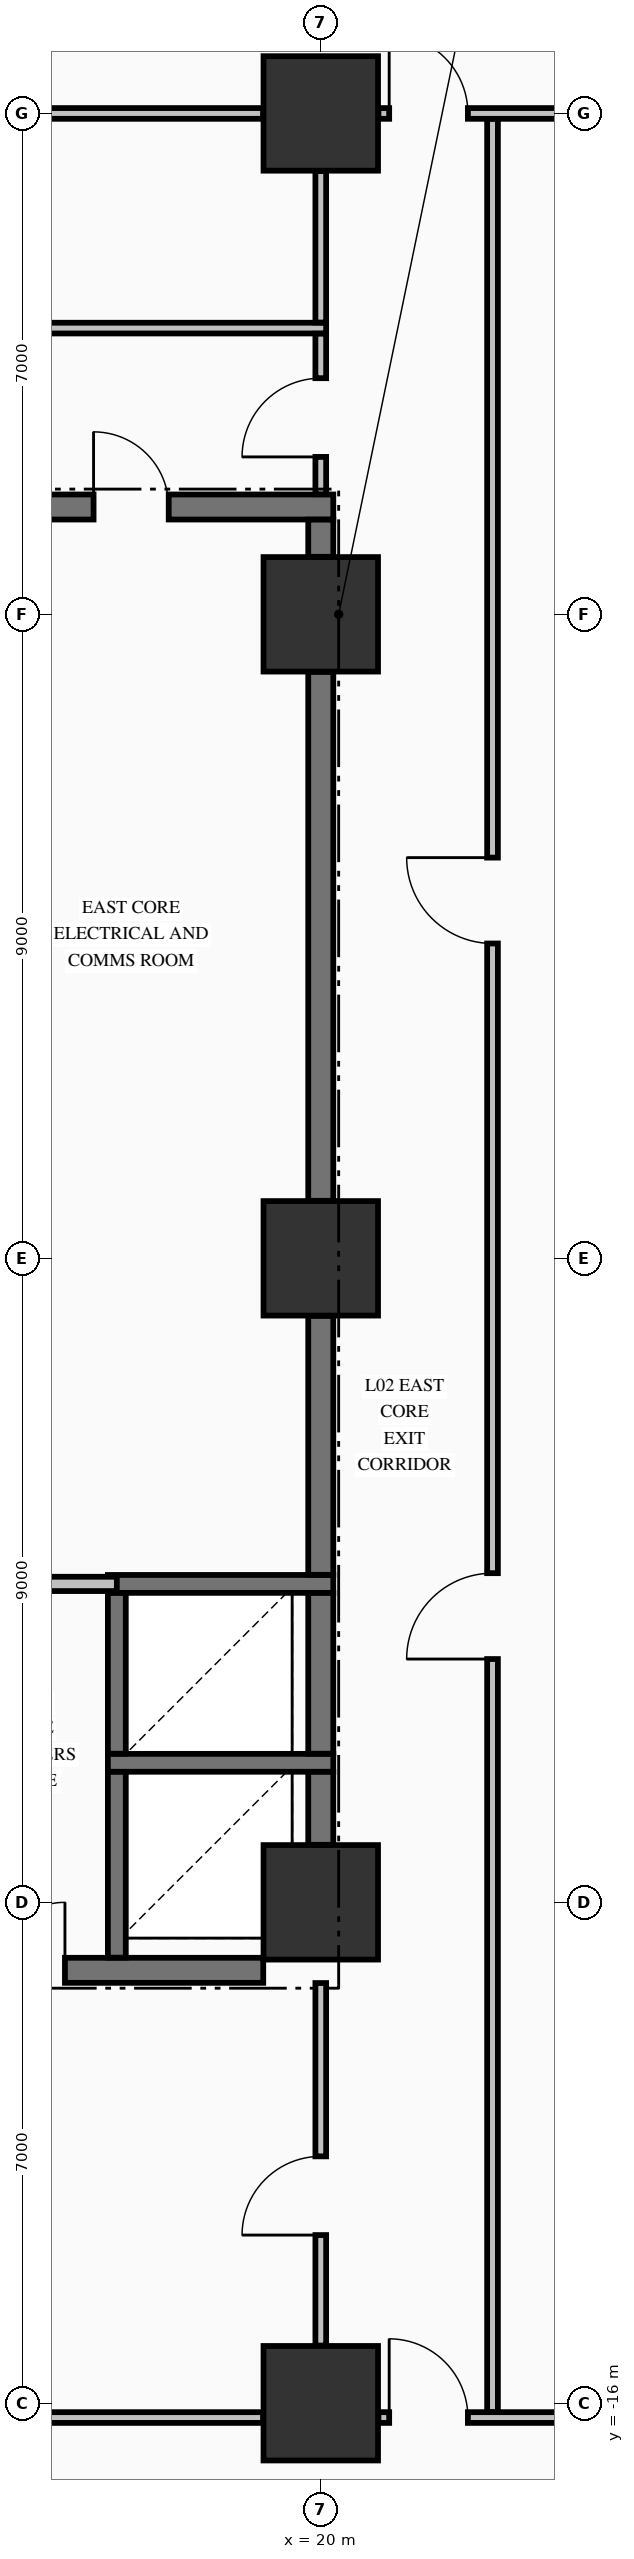
"""IFC4 building model, lengths in metres.
Left out: names, types, materials, properties, quantities, classifications, styles, units other than length and angle.
Written with IfcOpenShell. Run it as: python <this file> out.ifc"""

import sys

from ifc_helpers import new_model, si_unit, direction, frame, frame_2d, origin, origin_2d, place, context, subcontext, project, spatial, rectangle, extrude, element, fill, save


model = new_model("IFC4")
c1 = context("Model", 3, precision=1e-05, world=origin(), true_north=direction((0.0, 1.0)))
c2 = subcontext(c1, "Body", "Model", "MODEL_VIEW")
j1 = project(units=[si_unit("LENGTHUNIT", "METRE"), si_unit("PLANEANGLEUNIT", "RADIAN")], contexts=[c1])
p1 = place(None, origin())
s1 = spatial("IfcSite", under=j1, at=p1, CompositionType="ELEMENT")
p2 = place(p1, origin())
s2 = spatial("IfcBuilding", under=s1, at=p2, CompositionType="ELEMENT")
p3 = place(p2, frame((0.0, 0.0, 10.88)))
s3 = spatial("IfcBuildingStorey", under=s2, at=p3, CompositionType="ELEMENT", Elevation=10.88)
for number, where, z_axis, x_axis in (
    (1, (20.0, -16.0, 0.0), (0.0, 0.0, 1.0), (1.0, 0.0, 0.0)),
    (2, (20.0, -9.0, 0.0), (0.0, 0.0, 1.0), (1.0, 0.0, 0.0)),
    (3, (20.0, 0.0, 0.0), (0.0, 0.0, 1.0), (1.0, 0.0, 0.0)),
    (4, (20.0, 9.0, 0.0), (0.0, 0.0, 1.0), (1.0, 0.0, 0.0)),
    (5, (20.0, 16.0, 0.0), (0.0, 0.0, 1.0), (1.0, 0.0, 0.0)),
):
    element("IfcColumn", number, at=place(p3, frame(where, z_axis=z_axis, x_axis=x_axis)), inside=s3, PredefinedType="COLUMN", context=c2, shape_type="SweptSolid", body=[
        extrude(rectangle(XDim=1.6, YDim=1.6, at=origin_2d()), origin(), (0.0, 0.0, 1.0), 5.09),
    ])
p4 = place(p3, frame((14.7, -9.95, 0.0), z_axis=(0.0, 0.0, 1.0), x_axis=(1.0, 0.0, 0.0)))
e6 = element("IfcWall", 6, at=p4, inside=s3, PredefinedType="SHEAR", context=c2, shape_type="SweptSolid", body=[
    extrude(rectangle(XDim=4.496, YDim=0.35, at=frame_2d((2.248, 0.0))), origin(), (0.0, 0.0, 1.0), 5.09),
])
p5 = place(p4, frame((0.775, 0.0, 0.0)))
e7 = element("IfcOpeningElement", 7, at=p5, cuts=e6, PredefinedType="OPENING", context=c2, shape_type="SweptSolid", body=[
    extrude(rectangle(XDim=0.95, YDim=2.15, at=frame_2d((0.475, 1.075))), frame((0.0, 0.185, 0.0), z_axis=(0.0, -1.0, 0.0), x_axis=(1.0, 0.0, 0.0)), (0.0, 0.0, 1.0), 0.37),
])
for number, where, z_axis, x_axis in (
    (8, (17.025, -7.05, 0.0), (0.0, 0.0, 1.0), (1.0, 0.0, 0.0)),
    (9, (17.025, -4.55, 0.0), (0.0, 0.0, 1.0), (1.0, 0.0, 0.0)),
):
    element("IfcWall", number, at=place(p3, frame(where, z_axis=z_axis, x_axis=x_axis)), inside=s3, PredefinedType="SOLIDWALL", context=c2, shape_type="SweptSolid", body=[
        extrude(rectangle(XDim=3.15, YDim=0.25, at=frame_2d((1.575, 0.0))), origin(), (0.0, 0.0, 1.0), 5.09),
    ])
p6 = place(p3, frame((14.7, 10.5, 0.0), z_axis=(0.0, 0.0, 1.0), x_axis=(1.0, 0.0, 0.0)))
e10 = element("IfcWall", 10, at=p6, inside=s3, PredefinedType="SHEAR", context=c2, shape_type="SweptSolid", body=[
    extrude(rectangle(XDim=5.475, YDim=0.35, at=frame_2d((2.738, 0.0))), origin(), (0.0, 0.0, 1.0), 5.09),
])
p7 = place(p6, frame((2.125, 0.0, 0.0)))
e11 = element("IfcOpeningElement", 11, at=p7, cuts=e10, PredefinedType="OPENING", context=c2, shape_type="SweptSolid", body=[
    extrude(rectangle(XDim=1.05, YDim=2.15, at=frame_2d((0.525, 1.075))), frame((0.0, 0.185, 0.0), z_axis=(0.0, -1.0, 0.0), x_axis=(1.0, 0.0, 0.0)), (0.0, 0.0, 1.0), 0.37),
])
p8 = place(p3, frame((11.806, -16.2, 0.0), z_axis=(0.0, 0.0, 1.0), x_axis=(1.0, 0.0, 0.0)))
e12 = element("IfcWall", 12, at=p8, inside=s3, PredefinedType="PARTITIONING", context=c2, shape_type="SweptSolid", body=[
    extrude(rectangle(XDim=7.388, YDim=0.15, at=frame_2d((3.694, 0.0))), origin(), (0.0, 0.0, 1.0), 4.132),
])
p9 = place(p8, frame((3.094, 0.0, 0.0)))
e13 = element("IfcOpeningElement", 13, at=p9, cuts=e12, PredefinedType="OPENING", context=c2, shape_type="SweptSolid", body=[
    extrude(rectangle(XDim=1.2, YDim=2.15, at=frame_2d((0.6, 1.075))), frame((0.0, 0.085, 0.0), z_axis=(0.0, -1.0, 0.0), x_axis=(1.0, 0.0, 0.0)), (0.0, 0.0, 1.0), 0.17),
])
p10 = place(p3, frame((20.806, -16.2, 0.0), z_axis=(0.0, 0.0, 1.0), x_axis=(1.0, 0.0, 0.0)))
e14 = element("IfcWall", 14, at=p10, inside=s3, PredefinedType="PARTITIONING", context=c2, shape_type="SweptSolid", body=[
    extrude(rectangle(XDim=4.488, YDim=0.15, at=frame_2d((2.244, 0.0))), origin(), (0.0, 0.0, 1.0), 4.132),
])
p11 = place(p10, frame((0.15, 0.0, 0.0)))
e15 = element("IfcOpeningElement", 15, at=p11, cuts=e14, PredefinedType="OPENING", context=c2, shape_type="SweptSolid", body=[
    extrude(rectangle(XDim=1.1, YDim=2.15, at=frame_2d((0.55, 1.075))), frame((0.0, 0.085, 0.0), z_axis=(0.0, -1.0, 0.0), x_axis=(1.0, 0.0, 0.0)), (0.0, 0.0, 1.0), 0.17),
])
p12 = place(p10, frame((2.844, 0.0, 0.0)))
e16 = element("IfcOpeningElement", 16, at=p12, cuts=e14, PredefinedType="OPENING", context=c2, shape_type="SweptSolid", body=[
    extrude(rectangle(XDim=1.1, YDim=2.15, at=frame_2d((0.55, 1.075))), frame((0.0, 0.085, 0.0), z_axis=(0.0, -1.0, 0.0), x_axis=(1.0, 0.0, 0.0)), (0.0, 0.0, 1.0), 0.17),
])
p13 = place(p3, frame((14.878, -4.55, 0.0), z_axis=(0.0, 0.0, 1.0), x_axis=(1.0, 0.0, 0.0)))
e17 = element("IfcWall", 17, at=p13, inside=s3, PredefinedType="PARTITIONING", context=c2, shape_type="SweptSolid", body=[
    extrude(rectangle(XDim=2.272, YDim=0.2, at=frame_2d((1.136, 0.0))), origin(), (0.0, 0.0, 1.0), 5.09),
])
p14 = place(p3, frame((8.66, 13.0, 0.0), z_axis=(0.0, 0.0, 1.0), x_axis=(1.0, 0.0, 0.0)))
e18 = element("IfcWall", 18, at=p14, inside=s3, PredefinedType="PARTITIONING", context=c2, shape_type="SweptSolid", body=[
    extrude(rectangle(XDim=11.415, YDim=0.15, at=frame_2d((5.708, 0.0))), origin(), (0.0, 0.0, 1.0), 5.09),
])
p15 = place(p14, frame((0.59, 0.0, 0.0)))
e19 = element("IfcOpeningElement", 19, at=p15, cuts=e18, PredefinedType="OPENING", context=c2, shape_type="SweptSolid", body=[
    extrude(rectangle(XDim=1.1, YDim=2.15, at=frame_2d((0.55, 1.075))), frame((0.0, 0.085, 0.0), z_axis=(0.0, -1.0, 0.0), x_axis=(1.0, 0.0, 0.0)), (0.0, 0.0, 1.0), 0.17),
])
p16 = place(p3, frame((11.806, 16.0, 0.0), z_axis=(0.0, 0.0, 1.0), x_axis=(1.0, 0.0, 0.0)))
e20 = element("IfcWall", 20, at=p16, inside=s3, PredefinedType="PARTITIONING", context=c2, shape_type="SweptSolid", body=[
    extrude(rectangle(XDim=7.388, YDim=0.15, at=frame_2d((3.694, 0.0))), origin(), (0.0, 0.0, 1.0), 4.132),
])
p17 = place(p16, frame((3.144, 0.0, 0.0)))
e21 = element("IfcOpeningElement", 21, at=p17, cuts=e20, PredefinedType="OPENING", context=c2, shape_type="SweptSolid", body=[
    extrude(rectangle(XDim=1.1, YDim=2.15, at=frame_2d((0.55, 1.075))), frame((0.0, 0.085, 0.0), z_axis=(0.0, -1.0, 0.0), x_axis=(1.0, 0.0, 0.0)), (0.0, 0.0, 1.0), 0.17),
])
p18 = place(p3, frame((20.806, 16.0, 0.0), z_axis=(0.0, 0.0, 1.0), x_axis=(1.0, 0.0, 0.0)))
e22 = element("IfcWall", 22, at=p18, inside=s3, PredefinedType="PARTITIONING", context=c2, shape_type="SweptSolid", body=[
    extrude(rectangle(XDim=4.488, YDim=0.15, at=frame_2d((2.244, 0.0))), origin(), (0.0, 0.0, 1.0), 4.132),
])
p19 = place(p18, frame((0.15, 0.0, 0.0)))
e23 = element("IfcOpeningElement", 23, at=p19, cuts=e22, PredefinedType="OPENING", context=c2, shape_type="SweptSolid", body=[
    extrude(rectangle(XDim=1.1, YDim=2.15, at=frame_2d((0.55, 1.075))), frame((0.0, 0.085, 0.0), z_axis=(0.0, -1.0, 0.0), x_axis=(1.0, 0.0, 0.0)), (0.0, 0.0, 1.0), 0.17),
])
p20 = place(p18, frame((2.844, 0.0, 0.0)))
e24 = element("IfcOpeningElement", 24, at=p20, cuts=e22, PredefinedType="OPENING", context=c2, shape_type="SweptSolid", body=[
    extrude(rectangle(XDim=1.1, YDim=2.15, at=frame_2d((0.55, 1.075))), frame((0.0, 0.085, 0.0), z_axis=(0.0, -1.0, 0.0), x_axis=(1.0, 0.0, 0.0)), (0.0, 0.0, 1.0), 0.17),
])
p21 = place(p3, frame((17.15, -9.773, 0.0), z_axis=(0.0, 0.0, 1.0), x_axis=(0.0, 1.0, 0.0)))
e25 = element("IfcWall", 25, at=p21, inside=s3, PredefinedType="SOLIDWALL", context=c2, shape_type="SweptSolid", body=[
    extrude(rectangle(XDim=2.596, YDim=0.25, at=frame_2d((1.298, 0.0))), origin(), (0.0, 0.0, 1.0), 5.09),
])
p22 = place(p3, frame((17.15, -6.923, 0.0), z_axis=(0.0, 0.0, 1.0), x_axis=(0.0, 1.0, 0.0)))
e26 = element("IfcWall", 26, at=p22, inside=s3, PredefinedType="SOLIDWALL", context=c2, shape_type="SweptSolid", body=[
    extrude(rectangle(XDim=2.246, YDim=0.25, at=frame_2d((1.123, 0.0))), origin(), (0.0, 0.0, 1.0), 5.09),
])
p23 = place(p3, frame((20.0, -8.196, 0.0), z_axis=(0.0, 0.0, 1.0), x_axis=(0.0, 1.0, 0.0)))
e27 = element("IfcWall", 27, at=p23, inside=s3, PredefinedType="SHEAR", context=c2, shape_type="SweptSolid", body=[
    extrude(rectangle(XDim=1.019, YDim=0.35, at=frame_2d((0.51, 0.0))), origin(), (0.0, 0.0, 1.0), 5.09),
])
p24 = place(p3, frame((20.0, -6.923, 0.0), z_axis=(0.0, 0.0, 1.0), x_axis=(0.0, 1.0, 0.0)))
e28 = element("IfcWall", 28, at=p24, inside=s3, PredefinedType="SHEAR", context=c2, shape_type="SweptSolid", body=[
    extrude(rectangle(XDim=2.246, YDim=0.35, at=frame_2d((1.123, 0.0))), origin(), (0.0, 0.0, 1.0), 5.09),
])
p25 = place(p3, frame((20.0, -4.423, 0.0), z_axis=(0.0, 0.0, 1.0), x_axis=(0.0, 1.0, 0.0)))
e29 = element("IfcWall", 29, at=p25, inside=s3, PredefinedType="SHEAR", context=c2, shape_type="SweptSolid", body=[
    extrude(rectangle(XDim=3.619, YDim=0.35, at=frame_2d((1.81, 0.0))), origin(), (0.0, 0.0, 1.0), 5.09),
])
p26 = place(p3, frame((20.0, 0.804, 0.0), z_axis=(0.0, 0.0, 1.0), x_axis=(0.0, 1.0, 0.0)))
e30 = element("IfcWall", 30, at=p26, inside=s3, PredefinedType="SHEAR", context=c2, shape_type="SweptSolid", body=[
    extrude(rectangle(XDim=7.392, YDim=0.35, at=frame_2d((3.696, 0.0))), origin(), (0.0, 0.0, 1.0), 5.09),
])
p27 = place(p3, frame((20.0, 9.804, 0.0), z_axis=(0.0, 0.0, 1.0), x_axis=(0.0, 1.0, 0.0)))
e31 = element("IfcWall", 31, at=p27, inside=s3, PredefinedType="SHEAR", context=c2, shape_type="SweptSolid", body=[
    extrude(rectangle(XDim=0.519, YDim=0.35, at=frame_2d((0.26, 0.0))), origin(), (0.0, 0.0, 1.0), 5.09),
])
p28 = place(p3, frame((20.0, -15.194, 0.0), z_axis=(0.0, 0.0, 1.0), x_axis=(0.0, 1.0, 0.0)))
e32 = element("IfcWall", 32, at=p28, inside=s3, PredefinedType="PARTITIONING", context=c2, shape_type="SweptSolid", body=[
    extrude(rectangle(XDim=5.066, YDim=0.15, at=frame_2d((2.533, 0.0))), origin(), (0.0, 0.0, 1.0), 4.132),
])
p29 = place(p28, frame((1.544, 0.0, 0.0)))
e33 = element("IfcOpeningElement", 33, at=p29, cuts=e32, PredefinedType="OPENING", context=c2, shape_type="SweptSolid", body=[
    extrude(rectangle(XDim=1.1, YDim=2.15, at=frame_2d((0.55, 1.075))), frame((0.0, 0.085, 0.0), z_axis=(0.0, -1.0, 0.0), x_axis=(1.0, 0.0, 0.0)), (0.0, 0.0, 1.0), 0.17),
])
p30 = place(p3, frame((20.0, 10.678, 0.0), z_axis=(0.0, 0.0, 1.0), x_axis=(0.0, 1.0, 0.0)))
e34 = element("IfcWall", 34, at=p30, inside=s3, PredefinedType="PARTITIONING", context=c2, shape_type="SweptSolid", body=[
    extrude(rectangle(XDim=2.244, YDim=0.15, at=frame_2d((1.122, 0.0))), origin(), (0.0, 0.0, 1.0), 4.132),
])
p31 = place(p30, frame((0.522, 0.0, 0.0)))
e35 = element("IfcOpeningElement", 35, at=p31, cuts=e34, PredefinedType="OPENING", context=c2, shape_type="SweptSolid", body=[
    extrude(rectangle(XDim=1.1, YDim=2.15, at=frame_2d((0.55, 1.075))), frame((0.0, 0.085, 0.0), z_axis=(0.0, -1.0, 0.0), x_axis=(1.0, 0.0, 0.0)), (0.0, 0.0, 1.0), 0.17),
])
p32 = place(p3, frame((20.0, 13.078, 0.0), z_axis=(0.0, 0.0, 1.0), x_axis=(0.0, 1.0, 0.0)))
e36 = element("IfcWall", 36, at=p32, inside=s3, PredefinedType="PARTITIONING", context=c2, shape_type="SweptSolid", body=[
    extrude(rectangle(XDim=2.116, YDim=0.15, at=frame_2d((1.058, 0.0))), origin(), (0.0, 0.0, 1.0), 4.132),
])
p33 = place(p3, frame((22.4, -16.122, 0.0), z_axis=(0.0, 0.0, 1.0), x_axis=(0.0, 1.0, 0.0)))
e37 = element("IfcWall", 37, at=p33, inside=s3, PredefinedType="PARTITIONING", context=c2, shape_type="SweptSolid", body=[
    extrude(rectangle(XDim=32.044, YDim=0.15, at=frame_2d((16.022, 0.0))), origin(), (0.0, 0.0, 1.0), 5.09),
])
p34 = place(p33, frame((10.522, 0.0, 0.0)))
e38 = element("IfcOpeningElement", 38, at=p34, cuts=e37, PredefinedType="OPENING", context=c2, shape_type="SweptSolid", body=[
    extrude(rectangle(XDim=1.2, YDim=2.15, at=frame_2d((0.6, 1.075))), frame((0.0, 0.085, 0.0), z_axis=(0.0, -1.0, 0.0), x_axis=(1.0, 0.0, 0.0)), (0.0, 0.0, 1.0), 0.17),
])
p35 = place(p33, frame((20.522, 0.0, 0.0)))
e39 = element("IfcOpeningElement", 39, at=p35, cuts=e37, PredefinedType="OPENING", context=c2, shape_type="SweptSolid", body=[
    extrude(rectangle(XDim=1.2, YDim=2.15, at=frame_2d((0.6, 1.075))), frame((0.0, 0.085, 0.0), z_axis=(0.0, -1.0, 0.0), x_axis=(1.0, 0.0, 0.0)), (0.0, 0.0, 1.0), 0.17),
])
p36 = place(p5, origin())
e40 = element("IfcDoor", 40, at=p36, inside=s3, OperationType="SINGLE_SWING_RIGHT", PredefinedType="DOOR", context=c2, shape_type="SweptSolid", body=[
    extrude(rectangle(XDim=0.95, YDim=2.15, at=frame_2d((0.475, 1.075))), frame((0.0, 0.025, 0.0), z_axis=(0.0, -1.0, 0.0), x_axis=(1.0, 0.0, 0.0)), (0.0, 0.0, 1.0), 0.05),
])
fill(e7, e40)
p37 = place(p7, origin())
e41 = element("IfcDoor", 41, at=p37, inside=s3, OperationType="SINGLE_SWING_LEFT", PredefinedType="DOOR", context=c2, shape_type="SweptSolid", body=[
    extrude(rectangle(XDim=1.05, YDim=2.15, at=frame_2d((0.525, 1.075))), frame((0.0, 0.025, 0.0), z_axis=(0.0, -1.0, 0.0), x_axis=(1.0, 0.0, 0.0)), (0.0, 0.0, 1.0), 0.05),
])
fill(e11, e41)
p38 = place(p19, origin())
e42 = element("IfcDoor", 42, at=p38, inside=s3, OperationType="SINGLE_SWING_LEFT", PredefinedType="DOOR", context=c2, shape_type="SweptSolid", body=[
    extrude(rectangle(XDim=1.1, YDim=2.15, at=frame_2d((0.55, 1.075))), frame((0.0, 0.025, 0.0), z_axis=(0.0, -1.0, 0.0), x_axis=(1.0, 0.0, 0.0)), (0.0, 0.0, 1.0), 0.05),
])
fill(e23, e42)
p39 = place(p31, origin())
e43 = element("IfcDoor", 43, at=p39, inside=s3, OperationType="SINGLE_SWING_LEFT", PredefinedType="DOOR", context=c2, shape_type="SweptSolid", body=[
    extrude(rectangle(XDim=1.1, YDim=2.15, at=frame_2d((0.55, 1.075))), frame((0.0, 0.025, 0.0), z_axis=(0.0, -1.0, 0.0), x_axis=(1.0, 0.0, 0.0)), (0.0, 0.0, 1.0), 0.05),
])
fill(e35, e43)
p40 = place(p29, origin())
e44 = element("IfcDoor", 44, at=p40, inside=s3, OperationType="SINGLE_SWING_LEFT", PredefinedType="DOOR", context=c2, shape_type="SweptSolid", body=[
    extrude(rectangle(XDim=1.1, YDim=2.15, at=frame_2d((0.55, 1.075))), frame((0.0, 0.025, 0.0), z_axis=(0.0, -1.0, 0.0), x_axis=(1.0, 0.0, 0.0)), (0.0, 0.0, 1.0), 0.05),
])
fill(e33, e44)
p41 = place(p11, origin())
e45 = element("IfcDoor", 45, at=p41, inside=s3, OperationType="SINGLE_SWING_LEFT", PredefinedType="DOOR", context=c2, shape_type="SweptSolid", body=[
    extrude(rectangle(XDim=1.1, YDim=2.15, at=frame_2d((0.55, 1.075))), frame((0.0, 0.025, 0.0), z_axis=(0.0, -1.0, 0.0), x_axis=(1.0, 0.0, 0.0)), (0.0, 0.0, 1.0), 0.05),
])
fill(e15, e45)
p42 = place(p34, origin())
e46 = element("IfcDoor", 46, at=p42, inside=s3, OperationType="SINGLE_SWING_LEFT", PredefinedType="DOOR", context=c2, shape_type="SweptSolid", body=[
    extrude(rectangle(XDim=1.2, YDim=2.15, at=frame_2d((0.6, 1.075))), frame((0.0, 0.025, 0.0), z_axis=(0.0, -1.0, 0.0), x_axis=(1.0, 0.0, 0.0)), (0.0, 0.0, 1.0), 0.05),
])
fill(e38, e46)
p43 = place(p35, origin())
e47 = element("IfcDoor", 47, at=p43, inside=s3, OperationType="SINGLE_SWING_RIGHT", PredefinedType="DOOR", context=c2, shape_type="SweptSolid", body=[
    extrude(rectangle(XDim=1.2, YDim=2.15, at=frame_2d((0.6, 1.075))), frame((0.0, 0.025, 0.0), z_axis=(0.0, -1.0, 0.0), x_axis=(1.0, 0.0, 0.0)), (0.0, 0.0, 1.0), 0.05),
])
fill(e39, e47)
save(model, sys.argv[1])
